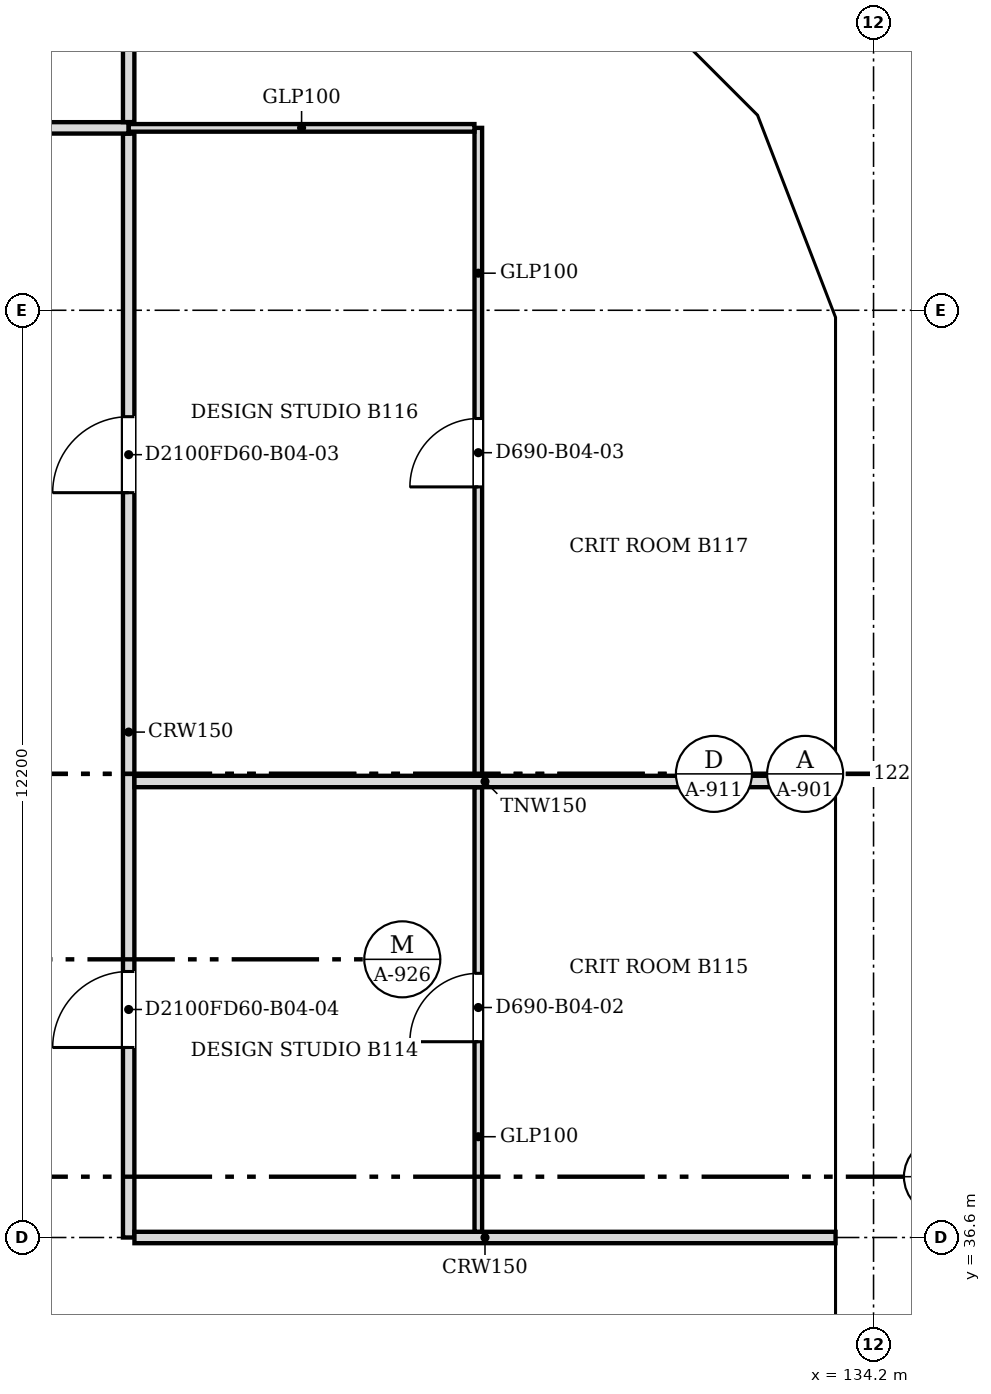
"""IFC4 building model, lengths in metres.
Left out: names, types, materials, properties, quantities, classifications, styles, units other than length and angle.
Written with IfcOpenShell. Run it as: python <this file> out.ifc"""

import sys

from ifc_helpers import new_model, si_unit, direction, frame, frame_2d, origin, place, context, subcontext, project, spatial, polyline, rectangle, outline, extrude, faceted_brep, source, transform, mapped, element, fill, save


model = new_model("IFC4")
c1 = context("Model", 3, precision=1e-05, world=origin(), true_north=direction((0.0, 1.0)))
c2 = subcontext(c1, "Body", "Model", "MODEL_VIEW")
j1 = project(units=[si_unit("LENGTHUNIT", "METRE"), si_unit("PLANEANGLEUNIT", "RADIAN")], contexts=[c1])
p1 = place(None, origin())
s1 = spatial("IfcSite", under=j1, at=p1, CompositionType="ELEMENT")
p2 = place(p1, origin())
s2 = spatial("IfcBuilding", under=s1, at=p2, CompositionType="ELEMENT")
p3 = place(p2, frame((0.0, 0.0, 37.2)))
s3 = spatial("IfcBuildingStorey", under=s2, at=p3, CompositionType="ELEMENT", Elevation=37.2)
m1 = source(origin(), c2, "Body", "Brep", [
    faceted_brep([(3.05, -0.25, 0.0), (6.1, -0.25, 3.8), (6.1, -0.25, 3.8), (3.05, -0.25, 7.6), (0.0, -0.25, 3.8), (0.0, 0.25, 3.8), (3.05, 0.25, 7.6), (6.1, 0.25, 3.8), (6.1, 0.25, 3.8), (3.05, 0.25, 0.0)], [[[0, 1, 2, 3, 4]], [[5, 6, 7, 8, 9]], [[9, 8, 1, 0]], [[7, 6, 3, 2]], [[6, 5, 4, 3]], [[5, 9, 0, 4]], [[1, 8, 7, 2]]]),
])
p4 = place(p3, frame((133.95, 33.55, -3.8), z_axis=(0.0, 0.0, 1.0), x_axis=(0.0, 1.0, 0.0)))
e1 = element("IfcWall", 1, at=p4, inside=s3, PredefinedType="SOLIDWALL", context=c2, shape_type="MappedRepresentation", body=[
    mapped(m1, transform((0.0, 0.0, 0.0), scale=1.0)),
])
m2 = source(origin(), c2, "Body", "SweptSolid", [
    extrude(outline(polyline([(3.05, 0.399), (5.78, 3.8), (3.05, 7.201), (0.321, 3.8), (3.05, 0.399)])), frame((0.0, 0.26, 0.0), z_axis=(0.0, -1.0, 0.0), x_axis=(1.0, 0.0, 0.0)), (0.0, 0.0, 1.0), 0.52),
])
p5 = place(p4, origin())
e2 = element("IfcOpeningElement", 2, at=p5, cuts=e1, PredefinedType="OPENING", context=c2, shape_type="MappedRepresentation", body=[
    mapped(m2, transform((0.0, 0.0, 0.0), scale=1.0)),
])
m3 = source(origin(), c2, "Body", "SweptSolid", [
    extrude(outline(polyline([(3.05, 0.0), (6.1, 3.8), (3.05, 7.6), (0.0, 3.8), (3.05, 0.0)])), frame((0.0, 0.25, 0.0), z_axis=(0.0, -1.0, 0.0), x_axis=(1.0, 0.0, 0.0)), (0.0, 0.0, 1.0), 0.5),
])
p6 = place(p3, frame((133.95, 39.65, -3.8), z_axis=(0.0, 0.0, 1.0), x_axis=(0.0, 1.0, 0.0)))
e3 = element("IfcWall", 3, at=p6, inside=s3, PredefinedType="SOLIDWALL", context=c2, shape_type="MappedRepresentation", body=[
    mapped(m3, transform((0.0, 0.0, 0.0), scale=1.0)),
])
p7 = place(p6, origin())
e4 = element("IfcOpeningElement", 4, at=p7, cuts=e3, PredefinedType="OPENING", context=c2, shape_type="MappedRepresentation", body=[
    mapped(m2, transform((0.0, 0.0, 0.0), scale=1.0)),
])
m4 = source(origin(), c2, "Body", "Brep", [
    faceted_brep([(3.003, -0.25, 0.0), (3.05, -0.25, 0.06), (3.05, -0.25, 7.54), (3.003, -0.25, 7.6), (0.0, -0.25, 3.8), (0.0, 0.25, 3.8), (2.957, 0.25, 7.541), (2.957, 0.25, 0.059), (3.003, 0.0, 0.0), (3.003, 0.0, 7.6)], [[[0, 1, 2, 3, 4]], [[5, 6, 7]], [[1, 0, 8]], [[9, 3, 2]], [[6, 5, 4, 3, 9]], [[5, 7, 8, 0, 4]], [[1, 8, 7, 6, 9, 2]]]),
])
p8 = place(p3, frame((133.95, 45.75, -3.8), z_axis=(0.0, 0.0, 1.0), x_axis=(0.0, 1.0, 0.0)))
e5 = element("IfcWall", 5, at=p8, inside=s3, PredefinedType="SOLIDWALL", context=c2, shape_type="MappedRepresentation", body=[
    mapped(m4, transform((0.0, 0.0, 0.0), scale=1.0)),
])
m5 = source(origin(), c2, "Body", "SweptSolid", [
    extrude(outline(polyline([(2.803, 6.944), (0.319, 3.8), (2.803, 0.656), (2.803, 6.944)])), frame((0.0, 0.26, 0.0), z_axis=(0.0, -1.0, 0.0), x_axis=(1.0, 0.0, 0.0)), (0.0, 0.0, 1.0), 0.52),
])
p9 = place(p8, origin())
e6 = element("IfcOpeningElement", 6, at=p9, cuts=e5, PredefinedType="OPENING", context=c2, shape_type="MappedRepresentation", body=[
    mapped(m5, transform((0.0, 0.0, 0.0), scale=1.0)),
])
m6 = source(origin(), c2, "Body", "Brep", [
    faceted_brep([(0.047, -0.25, 0.0), (2.997, -0.25, 3.8), (0.047, -0.25, 7.6), (0.0, -0.25, 7.541), (0.0, -0.25, 0.059), (0.093, 0.25, 7.54), (2.944, 0.25, 3.868), (2.944, 0.25, 3.732), (0.093, 0.25, 0.06), (2.997, 0.0, 3.8), (0.047, 0.0, 0.0), (0.047, 0.0, 7.6)], [[[0, 1, 2, 3, 4]], [[5, 6, 7, 8]], [[8, 7, 9, 1, 0, 10]], [[6, 5, 11, 2, 1, 9]], [[3, 2, 11]], [[10, 0, 4]], [[8, 10, 4, 3, 11, 5]], [[9, 7, 6]]]),
])
p10 = place(p3, frame((133.967, 48.71, -3.8), z_axis=(0.0, 0.0, 1.0), x_axis=(-0.359901446078, 0.932990326376, 0.0)))
e7 = element("IfcWall", 7, at=p10, inside=s3, PredefinedType="SOLIDWALL", context=c2, shape_type="MappedRepresentation", body=[
    mapped(m6, transform((0.0, 0.0, 0.0), scale=1.0)),
])
m7 = source(origin(), c2, "Body", "SweptSolid", [
    extrude(outline(polyline([(0.247, 0.665), (2.681, 3.8), (0.247, 6.935), (0.247, 0.665)])), frame((0.0, 0.26, 0.0), z_axis=(0.0, -1.0, 0.0), x_axis=(1.0, 0.0, 0.0)), (0.0, 0.0, 1.0), 0.52),
])
p11 = place(p10, origin())
e8 = element("IfcOpeningElement", 8, at=p11, cuts=e7, PredefinedType="OPENING", context=c2, shape_type="MappedRepresentation", body=[
    mapped(m7, transform((0.0, 0.0, 0.0), scale=1.0)),
])
m8 = source(origin(), c2, "Body", "Brep", [
    faceted_brep([(2.944, -0.25, 0.0), (2.997, -0.25, 0.068), (2.997, -0.25, 7.532), (2.944, -0.25, 7.6), (0.0, -0.25, 3.8), (0.053, 0.25, 3.868), (2.891, 0.25, 7.532), (2.891, 0.25, 0.068), (0.053, 0.25, 3.732), (2.944, 0.0, 0.0), (2.944, 0.0, 7.6), (0.0, 0.0, 3.8)], [[[0, 1, 2, 3, 4]], [[5, 6, 7, 8]], [[1, 0, 9]], [[10, 3, 2]], [[6, 5, 11, 4, 3, 10]], [[8, 7, 9, 0, 4, 11]], [[8, 11, 5]], [[1, 9, 7, 6, 10, 2]]]),
])
p12 = place(p3, frame((132.888, 51.506, -3.8), z_axis=(0.0, 0.0, 1.0), x_axis=(-0.707147509625, 0.707066050402, 0.0)))
e9 = element("IfcWall", 9, at=p12, inside=s3, PredefinedType="SOLIDWALL", context=c2, shape_type="MappedRepresentation", body=[
    mapped(m8, transform((0.0, 0.0, 0.0), scale=1.0)),
])
m9 = source(origin(), c2, "Body", "SweptSolid", [
    extrude(outline(polyline([(2.744, 6.934), (0.316, 3.8), (2.744, 0.667), (2.744, 6.934)])), frame((0.0, 0.26, 0.0), z_axis=(0.0, -1.0, 0.0), x_axis=(1.0, 0.0, 0.0)), (0.0, 0.0, 1.0), 0.52),
])
p13 = place(p12, origin())
e10 = element("IfcOpeningElement", 10, at=p13, cuts=e9, PredefinedType="OPENING", context=c2, shape_type="MappedRepresentation", body=[
    mapped(m9, transform((0.0, 0.0, 0.0), scale=1.0)),
])
p14 = place(p2, frame((0.0, 0.0, 41.0)))
s4 = spatial("IfcBuildingStorey", under=s2, at=p14, CompositionType="ELEMENT", Elevation=41.0)
p15 = place(p14, frame((133.95, 30.5, -3.8), z_axis=(0.0, 0.0, 1.0), x_axis=(0.0, 1.0, 0.0)))
e11 = element("IfcWall", 11, at=p15, inside=s4, PredefinedType="SOLIDWALL", context=c2, shape_type="MappedRepresentation", body=[
    mapped(m3, transform((0.0, 0.0, 0.0), scale=1.0)),
])
p16 = place(p15, origin())
e12 = element("IfcOpeningElement", 12, at=p16, cuts=e11, PredefinedType="OPENING", context=c2, shape_type="MappedRepresentation", body=[
    mapped(m2, transform((0.0, 0.0, 0.0), scale=1.0)),
])
p17 = place(p14, frame((133.95, 36.6, -3.8), z_axis=(0.0, 0.0, 1.0), x_axis=(0.0, 1.0, 0.0)))
e13 = element("IfcWall", 13, at=p17, inside=s4, PredefinedType="SOLIDWALL", context=c2, shape_type="MappedRepresentation", body=[
    mapped(m1, transform((0.0, 0.0, 0.0), scale=1.0)),
])
p18 = place(p17, origin())
e14 = element("IfcOpeningElement", 14, at=p18, cuts=e13, PredefinedType="OPENING", context=c2, shape_type="MappedRepresentation", body=[
    mapped(m2, transform((0.0, 0.0, 0.0), scale=1.0)),
])
m10 = source(origin(), c2, "Body", "Brep", [
    faceted_brep([(3.05, -0.25, 0.0), (6.053, -0.25, 3.8), (3.05, -0.25, 7.6), (0.0, -0.25, 3.8), (0.0, 0.25, 3.8), (3.05, 0.25, 7.6), (6.007, 0.25, 3.859), (6.007, 0.25, 3.741), (3.05, 0.25, 0.0), (6.053, 0.0, 3.8)], [[[0, 1, 2, 3]], [[4, 5, 6, 7, 8]], [[8, 7, 9, 1, 0]], [[6, 5, 2, 1, 9]], [[5, 4, 3, 2]], [[4, 8, 0, 3]], [[9, 7, 6]]]),
])
p19 = place(p14, frame((133.95, 42.7, -3.8), z_axis=(0.0, 0.0, 1.0), x_axis=(0.0, 1.0, 0.0)))
e15 = element("IfcWall", 15, at=p19, inside=s4, PredefinedType="SOLIDWALL", context=c2, shape_type="MappedRepresentation", body=[
    mapped(m10, transform((0.0, 0.0, 0.0), scale=1.0)),
])
m11 = source(origin(), c2, "Body", "SweptSolid", [
    extrude(outline(polyline([(3.049, 0.401), (5.735, 3.8), (3.049, 7.199), (0.321, 3.8), (3.049, 0.401)])), frame((0.0, 0.26, 0.0), z_axis=(0.0, -1.0, 0.0), x_axis=(1.0, 0.0, 0.0)), (0.0, 0.0, 1.0), 0.52),
])
p20 = place(p19, origin())
e16 = element("IfcOpeningElement", 16, at=p20, cuts=e15, PredefinedType="OPENING", context=c2, shape_type="MappedRepresentation", body=[
    mapped(m11, transform((0.0, 0.0, 0.0), scale=1.0)),
])
m12 = source(origin(), c2, "Body", "Brep", [
    faceted_brep([(2.95, -0.25, 0.0), (3.003, -0.25, 0.068), (3.003, -0.25, 7.532), (2.95, -0.25, 7.6), (0.0, -0.25, 3.8), (0.047, 0.25, 3.86), (2.898, 0.25, 7.532), (2.898, 0.25, 0.068), (0.047, 0.25, 3.74), (2.95, 0.0, 0.0), (2.95, 0.0, 7.6), (0.0, 0.0, 3.8)], [[[0, 1, 2, 3, 4]], [[5, 6, 7, 8]], [[1, 0, 9]], [[10, 3, 2]], [[6, 5, 11, 4, 3, 10]], [[8, 7, 9, 0, 4, 11]], [[8, 11, 5]], [[1, 9, 7, 6, 10, 2]]]),
])
p21 = place(p14, frame((133.95, 48.753, -3.8), z_axis=(0.0, 0.0, 1.0), x_axis=(-0.359855894603, 0.933007896601, 0.0)))
e17 = element("IfcWall", 17, at=p21, inside=s4, PredefinedType="SOLIDWALL", context=c2, shape_type="MappedRepresentation", body=[
    mapped(m12, transform((0.0, 0.0, 0.0), scale=1.0)),
])
m13 = source(origin(), c2, "Body", "SweptSolid", [
    extrude(outline(polyline([(2.75, 6.935), (0.316, 3.8), (2.75, 0.665), (2.75, 6.935)])), frame((0.0, 0.26, 0.0), z_axis=(0.0, -1.0, 0.0), x_axis=(1.0, 0.0, 0.0)), (0.0, 0.0, 1.0), 0.52),
])
p22 = place(p21, origin())
e18 = element("IfcOpeningElement", 18, at=p22, cuts=e17, PredefinedType="OPENING", context=c2, shape_type="MappedRepresentation", body=[
    mapped(m13, transform((0.0, 0.0, 0.0), scale=1.0)),
])
m14 = source(origin(), c2, "Body", "Brep", [
    faceted_brep([(0.053, -0.25, 0.0), (2.997, -0.25, 3.8), (0.053, -0.25, 7.6), (0.0, -0.25, 7.532), (0.0, -0.25, 0.068), (0.106, 0.25, 7.532), (2.944, 0.25, 3.868), (2.944, 0.25, 3.732), (0.106, 0.25, 0.068), (2.997, 0.0, 3.8), (0.053, 0.0, 0.0), (0.053, 0.0, 7.6)], [[[0, 1, 2, 3, 4]], [[5, 6, 7, 8]], [[8, 7, 9, 1, 0, 10]], [[6, 5, 11, 2, 1, 9]], [[3, 2, 11]], [[10, 0, 4]], [[8, 10, 4, 3, 11, 5]], [[9, 7, 6]]]),
])
p23 = place(p14, frame((132.926, 51.469, -3.8), z_axis=(0.0, 0.0, 1.0), x_axis=(-0.707066050402, 0.707147509625, 0.0)))
e19 = element("IfcWall", 19, at=p23, inside=s4, PredefinedType="SOLIDWALL", context=c2, shape_type="MappedRepresentation", body=[
    mapped(m14, transform((0.0, 0.0, 0.0), scale=1.0)),
])
m15 = source(origin(), c2, "Body", "SweptSolid", [
    extrude(outline(polyline([(0.253, 0.666), (2.681, 3.8), (0.253, 6.934), (0.253, 0.666)])), frame((0.0, 0.26, 0.0), z_axis=(0.0, -1.0, 0.0), x_axis=(1.0, 0.0, 0.0)), (0.0, 0.0, 1.0), 0.52),
])
p24 = place(p23, origin())
e20 = element("IfcOpeningElement", 20, at=p24, cuts=e19, PredefinedType="OPENING", context=c2, shape_type="MappedRepresentation", body=[
    mapped(m15, transform((0.0, 0.0, 0.0), scale=1.0)),
])
p25 = place(p3, frame((124.4, 51.124, 0.0), z_axis=(0.0, 0.0, 1.0), x_axis=(0.0, -1.0, 0.0)))
e21 = element("IfcWall", 21, at=p25, inside=s3, PredefinedType="PARTITIONING", context=c2, shape_type="SweptSolid", body=[
    extrude(rectangle(XDim=14.524, YDim=0.15, at=frame_2d((7.262, 0.0))), origin(), (0.0, 0.0, 1.0), 3.067),
])
m16 = source(origin(), c2, "Body", "SweptSolid", [
    extrude(rectangle(XDim=1.0, YDim=2.1, at=frame_2d((0.5, 1.05))), frame((0.0, 0.085, 0.0), z_axis=(0.0, -1.0, 0.0), x_axis=(1.0, 0.0, 0.0)), (0.0, 0.0, 1.0), 0.17),
])
p26 = place(p25, frame((3.724, 0.0, 0.0)))
e22 = element("IfcOpeningElement", 22, at=p26, cuts=e21, PredefinedType="OPENING", context=c2, shape_type="MappedRepresentation", body=[
    mapped(m16, transform((0.0, 0.0, 0.0), scale=1.0)),
])
p27 = place(p25, frame((11.024, 0.0, 0.0)))
e23 = element("IfcOpeningElement", 23, at=p27, cuts=e21, PredefinedType="OPENING", context=c2, shape_type="MappedRepresentation", body=[
    mapped(m16, transform((0.0, 0.0, 0.0), scale=1.0)),
])
p28 = place(p3, frame((124.476, 36.6, 0.0), z_axis=(0.0, 0.0, 1.0), x_axis=(1.0, 0.0, 0.0)))
e24 = element("IfcWall", 24, at=p28, inside=s3, PredefinedType="PARTITIONING", context=c2, shape_type="SweptSolid", body=[
    extrude(rectangle(XDim=9.224, YDim=0.15, at=frame_2d((4.612, 0.0))), origin(), (0.0, 0.0, 1.0), 3.067),
])
p29 = place(p3, frame((129.0, 42.524, 0.0), z_axis=(0.0, 0.0, 1.0), x_axis=(0.0, -1.0, 0.0)))
e25 = element("IfcWall", 25, at=p29, inside=s3, PredefinedType="PARTITIONING", context=c2, shape_type="SweptSolid", body=[
    extrude(rectangle(XDim=5.848, YDim=0.1, at=frame_2d((2.924, 0.0))), origin(), (0.0, 0.0, 1.0), 3.067),
])
m17 = source(origin(), c2, "Body", "SweptSolid", [
    extrude(rectangle(XDim=0.9, YDim=2.1, at=frame_2d((0.45, 1.05))), frame((0.0, 0.06, 0.0), z_axis=(0.0, -1.0, 0.0), x_axis=(1.0, 0.0, 0.0)), (0.0, 0.0, 1.0), 0.12),
])
p30 = place(p29, frame((2.448, 0.0, 0.0)))
e26 = element("IfcOpeningElement", 26, at=p30, cuts=e25, PredefinedType="OPENING", context=c2, shape_type="MappedRepresentation", body=[
    mapped(m17, transform((0.0, 0.0, 0.0), scale=1.0)),
])
p31 = place(p3, frame((124.476, 42.6, 0.0), z_axis=(0.0, 0.0, 1.0), x_axis=(1.0, 0.0, 0.0)))
e27 = element("IfcWall", 27, at=p31, inside=s3, PredefinedType="PARTITIONING", context=c2, shape_type="SweptSolid", body=[
    extrude(rectangle(XDim=9.224, YDim=0.15, at=frame_2d((4.612, 0.0))), origin(), (0.0, 0.0, 1.0), 3.067),
])
p32 = place(p3, frame((129.0, 51.2, 0.0), z_axis=(0.0, 0.0, 1.0), x_axis=(0.0, -1.0, 0.0)))
e28 = element("IfcWall", 28, at=p32, inside=s3, PredefinedType="PARTITIONING", context=c2, shape_type="SweptSolid", body=[
    extrude(rectangle(XDim=8.524, YDim=0.1, at=frame_2d((4.262, 0.0))), origin(), (0.0, 0.0, 1.0), 3.067),
])
p33 = place(p32, frame((3.824, 0.0, 0.0)))
e29 = element("IfcOpeningElement", 29, at=p33, cuts=e28, PredefinedType="OPENING", context=c2, shape_type="MappedRepresentation", body=[
    mapped(m17, transform((0.0, 0.0, 0.0), scale=1.0)),
])
p34 = place(p3, frame((108.5, 51.2, 0.0), z_axis=(0.0, 0.0, 1.0), x_axis=(1.0, 0.0, 0.0)))
e30 = element("IfcWall", 30, at=p34, inside=s3, PredefinedType="PARTITIONING", context=c2, shape_type="SweptSolid", body=[
    extrude(rectangle(XDim=15.9, YDim=0.15, at=frame_2d((7.95, 0.0))), origin(), (0.0, 0.0, 1.0), 3.067),
])
m18 = source(origin(), c2, "Body", "SweptSolid", [
    extrude(rectangle(XDim=0.9, YDim=2.1, at=frame_2d((0.45, 1.05))), frame((0.0, 0.085, 0.0), z_axis=(0.0, -1.0, 0.0), x_axis=(1.0, 0.0, 0.0)), (0.0, 0.0, 1.0), 0.17),
])
p35 = place(p34, frame((7.5, 0.0, 0.0)))
e31 = element("IfcOpeningElement", 31, at=p35, cuts=e30, PredefinedType="OPENING", context=c2, shape_type="MappedRepresentation", body=[
    mapped(m18, transform((0.0, 0.0, 0.0), scale=1.0)),
])
p36 = place(p3, frame((124.401, 51.2, 0.0), z_axis=(0.0, 0.0, 1.0), x_axis=(1.0, 0.0, 0.0)))
e32 = element("IfcWall", 32, at=p36, inside=s3, PredefinedType="PARTITIONING", context=c2, shape_type="SweptSolid", body=[
    extrude(rectangle(XDim=4.548, YDim=0.1, at=frame_2d((2.274, 0.0))), origin(), (0.0, 0.0, 1.0), 3.067),
])
p37 = place(p3, frame((124.4, 51.276, 0.0), z_axis=(0.0, 0.0, 1.0), x_axis=(0.0, 1.0, 0.0)))
e33 = element("IfcWall", 33, at=p37, inside=s3, PredefinedType="PARTITIONING", context=c2, shape_type="SweptSolid", body=[
    extrude(rectangle(XDim=3.124, YDim=0.15, at=frame_2d((1.562, 0.0))), origin(), (0.0, 0.0, 1.0), 3.067),
])
m19 = source(origin(), c2, "Body", "SweptSolid", [
    extrude(rectangle(XDim=0.9, YDim=2.1, at=frame_2d((0.45, 1.05))), frame((0.0, 0.025, 0.0), z_axis=(0.0, -1.0, 0.0), x_axis=(1.0, 0.0, 0.0)), (0.0, 0.0, 1.0), 0.05),
])
p38 = place(p30, origin())
e34 = element("IfcDoor", 34, at=p38, inside=s3, OperationType="SINGLE_SWING_RIGHT", PredefinedType="DOOR", context=c2, shape_type="MappedRepresentation", body=[
    mapped(m19, transform((0.0, 0.0, 0.0), scale=1.0)),
])
fill(e26, e34)
m20 = source(origin(), c2, "Body", "SweptSolid", [
    extrude(rectangle(XDim=1.0, YDim=2.1, at=frame_2d((0.5, 1.05))), frame((0.0, 0.025, 0.0), z_axis=(0.0, -1.0, 0.0), x_axis=(1.0, 0.0, 0.0)), (0.0, 0.0, 1.0), 0.05),
])
p39 = place(p26, origin())
e35 = element("IfcDoor", 35, at=p39, inside=s3, OperationType="SINGLE_SWING_RIGHT", PredefinedType="DOOR", context=c2, shape_type="MappedRepresentation", body=[
    mapped(m20, transform((0.0, 0.0, 0.0), scale=1.0)),
])
fill(e22, e35)
p40 = place(p27, origin())
e36 = element("IfcDoor", 36, at=p40, inside=s3, OperationType="SINGLE_SWING_RIGHT", PredefinedType="DOOR", context=c2, shape_type="MappedRepresentation", body=[
    mapped(m20, transform((0.0, 0.0, 0.0), scale=1.0)),
])
fill(e23, e36)
p41 = place(p33, origin())
e37 = element("IfcDoor", 37, at=p41, inside=s3, OperationType="SINGLE_SWING_RIGHT", PredefinedType="DOOR", context=c2, shape_type="MappedRepresentation", body=[
    mapped(m19, transform((0.0, 0.0, 0.0), scale=1.0)),
])
fill(e29, e37)
save(model, sys.argv[1])
